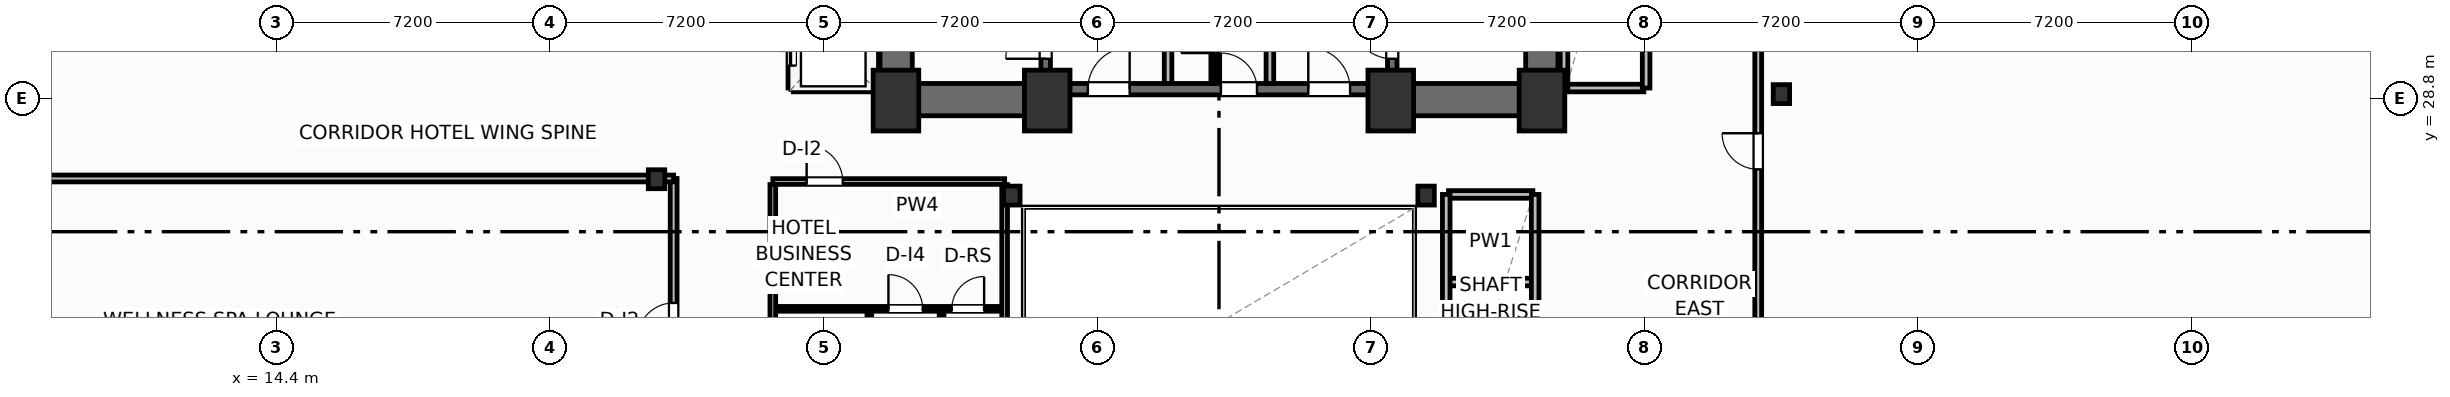
"""IFC4 building model, lengths in metres.
Left out: names, types, materials, properties, quantities, classifications, styles, units other than length and angle.
Written with IfcOpenShell. Run it as: python <this file> out.ifc"""

import sys

from ifc_helpers import new_model, si_unit, direction, frame, frame_2d, origin, origin_2d, place, context, subcontext, project, spatial, rectangle, i_section, extrude, element, fill, save


model = new_model("IFC4")
c1 = context("Model", 3, precision=1e-05, world=origin(), true_north=direction((0.0, 1.0)))
c2 = subcontext(c1, "Body", "Model", "MODEL_VIEW")
j1 = project(units=[si_unit("LENGTHUNIT", "METRE"), si_unit("PLANEANGLEUNIT", "RADIAN")], contexts=[c1])
p1 = place(None, origin())
s1 = spatial("IfcSite", under=j1, at=p1, CompositionType="ELEMENT")
p2 = place(p1, origin())
s2 = spatial("IfcBuilding", under=s1, at=p2, CompositionType="ELEMENT")
p3 = place(p2, frame((0.0, 0.0, 30.7)))
s3 = spatial("IfcBuildingStorey", under=s2, at=p3, CompositionType="ELEMENT", Elevation=30.7)
for number, where, z_axis, x_axis in (
    (1, (30.7, 28.75, 0.0), (0.0, 0.0, 1.0), (1.0, 0.0, 0.0)),
    (2, (34.68, 28.75, 0.0), (0.0, 0.0, 1.0), (1.0, 0.0, 0.0)),
    (3, (43.72, 28.75, 0.0), (0.0, 0.0, 1.0), (1.0, 0.0, 0.0)),
    (4, (47.7, 28.75, 0.0), (0.0, 0.0, 1.0), (1.0, 0.0, 0.0)),
):
    element("IfcColumn", number, at=place(p3, frame(where, z_axis=z_axis, x_axis=x_axis)), inside=s3, PredefinedType="COLUMN", context=c2, shape_type="SweptSolid", body=[
        extrude(rectangle(XDim=1.2, YDim=1.6, at=origin_2d()), origin(), (0.0, 0.0, 1.0), 3.7),
    ])
for number, where, z_axis, x_axis in (
    (5, (33.75, 26.25, 0.0), (0.0, 0.0, 1.0), (1.0, 0.0, 0.0)),
    (6, (44.65, 26.25, 0.0), (0.0, 0.0, 1.0), (1.0, 0.0, 0.0)),
    (7, (24.4, 26.68, 0.0), (0.0, 0.0, 1.0), (1.0, 0.0, 0.0)),
    (8, (54.0, 28.92, 0.0), (0.0, 0.0, 1.0), (1.0, 0.0, 0.0)),
):
    element("IfcColumn", number, at=place(p3, frame(where, z_axis=z_axis, x_axis=x_axis)), inside=s3, PredefinedType="COLUMN", context=c2, shape_type="SweptSolid", body=[
        extrude(i_section(OverallWidth=0.432, OverallDepth=0.498, WebThickness=0.056, FlangeThickness=0.089, FilletRadius=0.025, at=origin_2d()), origin(), (0.0, 0.0, 1.0), 3.7),
    ])
for number, where, z_axis, x_axis in (
    (9, (30.705, 29.2, 0.0), (0.0, 0.0, 1.0), (0.0, 1.0, 0.0)),
    (10, (47.695, 29.2, 0.0), (0.0, 0.0, 1.0), (0.0, 1.0, 0.0)),
):
    element("IfcWall", number, at=place(p3, frame(where, z_axis=z_axis, x_axis=x_axis)), inside=s3, PredefinedType="SHEAR", context=c2, shape_type="SweptSolid", body=[
        extrude(rectangle(XDim=9.22, YDim=0.85, at=frame_2d((4.61, 0.0))), origin(), (0.0, 0.0, 1.0), 3.45),
    ])
for number, where, z_axis, x_axis in (
    (11, (30.28, 28.775, 0.0), (0.0, 0.0, 1.0), (1.0, 0.0, 0.0)),
    (12, (43.6, 28.775, 0.0), (0.0, 0.0, 1.0), (1.0, 0.0, 0.0)),
):
    element("IfcWall", number, at=place(p3, frame(where, z_axis=z_axis, x_axis=x_axis)), inside=s3, PredefinedType="SHEAR", context=c2, shape_type="SweptSolid", body=[
        extrude(rectangle(XDim=4.52, YDim=0.85, at=frame_2d((2.26, 0.0))), origin(), (0.0, 0.0, 1.0), 3.45),
    ])
p4 = place(p3, frame((34.8, 29.05, 0.0), z_axis=(0.0, 0.0, 1.0), x_axis=(1.0, 0.0, 0.0)))
e13 = element("IfcWall", 13, at=p4, inside=s3, PredefinedType="SHEAR", context=c2, shape_type="SweptSolid", body=[
    extrude(rectangle(XDim=8.8, YDim=0.3, at=frame_2d((4.4, 0.0))), origin(), (0.0, 0.0, 1.0), 3.45),
])
p5 = place(p4, frame((0.95, 0.0, 0.0)))
e14 = element("IfcOpeningElement", 14, at=p5, cuts=e13, PredefinedType="OPENING", context=c2, shape_type="SweptSolid", body=[
    extrude(rectangle(XDim=1.1, YDim=2.15, at=frame_2d((0.55, 1.075))), frame((0.0, 0.16, 0.0), z_axis=(0.0, -1.0, 0.0), x_axis=(1.0, 0.0, 0.0)), (0.0, 0.0, 1.0), 0.32),
])
p6 = place(p4, frame((6.75, 0.0, 0.0)))
e15 = element("IfcOpeningElement", 15, at=p6, cuts=e13, PredefinedType="OPENING", context=c2, shape_type="SweptSolid", body=[
    extrude(rectangle(XDim=1.1, YDim=2.15, at=frame_2d((0.55, 1.075))), frame((0.0, 0.16, 0.0), z_axis=(0.0, -1.0, 0.0), x_axis=(1.0, 0.0, 0.0)), (0.0, 0.0, 1.0), 0.32),
])
p7 = place(p4, frame((4.45, 0.0, 0.0)))
e16 = element("IfcOpeningElement", 16, at=p7, cuts=e13, PredefinedType="OPENING", context=c2, shape_type="SweptSolid", body=[
    extrude(rectangle(XDim=0.95, YDim=2.15, at=frame_2d((0.475, 1.075))), frame((0.0, 0.16, 0.0), z_axis=(0.0, -1.0, 0.0), x_axis=(1.0, 0.0, 0.0)), (0.0, 0.0, 1.0), 0.32),
])
p8 = place(p3, frame((34.64, 29.2, 0.0), z_axis=(0.0, 0.0, 1.0), x_axis=(0.0, 1.0, 0.0)))
e17 = element("IfcWall", 17, at=p8, inside=s3, PredefinedType="SHEAR", context=c2, shape_type="SweptSolid", body=[
    extrude(rectangle(XDim=9.22, YDim=0.25, at=frame_2d((4.61, 0.0))), origin(), (0.0, 0.0, 1.0), 3.45),
])
p9 = place(p8, frame((0.65, 0.0, 0.0)))
e18 = element("IfcOpeningElement", 18, at=p9, cuts=e17, PredefinedType="OPENING", context=c2, shape_type="SweptSolid", body=[
    extrude(rectangle(XDim=1.05, YDim=2.15, at=frame_2d((0.525, 1.075))), frame((0.0, 0.135, 0.0), z_axis=(0.0, -1.0, 0.0), x_axis=(1.0, 0.0, 0.0)), (0.0, 0.0, 1.0), 0.27),
])
p10 = place(p3, frame((43.76, 29.2, 0.0), z_axis=(0.0, 0.0, 1.0), x_axis=(0.0, 1.0, 0.0)))
e19 = element("IfcWall", 19, at=p10, inside=s3, PredefinedType="SHEAR", context=c2, shape_type="SweptSolid", body=[
    extrude(rectangle(XDim=9.22, YDim=0.25, at=frame_2d((4.61, 0.0))), origin(), (0.0, 0.0, 1.0), 3.45),
])
p11 = place(p10, frame((0.65, 0.0, 0.0)))
e20 = element("IfcOpeningElement", 20, at=p11, cuts=e19, PredefinedType="OPENING", context=c2, shape_type="SweptSolid", body=[
    extrude(rectangle(XDim=1.05, YDim=2.15, at=frame_2d((0.525, 1.075))), frame((0.0, 0.135, 0.0), z_axis=(0.0, -1.0, 0.0), x_axis=(1.0, 0.0, 0.0)), (0.0, 0.0, 1.0), 0.27),
])
p12 = place(p3, frame((-2.728, 23.605, 0.0), z_axis=(0.0, 0.0, 1.0), x_axis=(0.823535075462, -0.567265351915, 0.0)))
e21 = element("IfcWall", 21, at=p12, inside=s3, PredefinedType="SOLIDWALL", context=c2, shape_type="SweptSolid", body=[
    extrude(rectangle(XDim=23.247, YDim=0.22, at=frame_2d((11.624, 0.0))), origin(), (0.0, 0.0, 1.0), 2.73),
])
p13 = place(p12, frame((10.799, 0.0, 0.8)))
e22 = element("IfcOpeningElement", 22, at=p13, cuts=e21, PredefinedType="OPENING", context=c2, shape_type="SweptSolid", body=[
    extrude(rectangle(XDim=1.65, YDim=1.65, at=frame_2d((0.825, 0.825))), frame((0.0, 0.12, 0.0), z_axis=(0.0, -1.0, 0.0), x_axis=(1.0, 0.0, 0.0)), (0.0, 0.0, 1.0), 0.24),
])
p14 = place(p3, frame((81.127, 26.995, 0.0), z_axis=(0.0, 0.0, 1.0), x_axis=(-0.823530169317, 0.567272474411, 0.0)))
e23 = element("IfcWall", 23, at=p14, inside=s3, PredefinedType="SOLIDWALL", context=c2, shape_type="SweptSolid", body=[
    extrude(rectangle(XDim=23.247, YDim=0.22, at=frame_2d((11.624, 0.0))), origin(), (0.0, 0.0, 1.0), 2.73),
])
p15 = place(p14, frame((10.799, 0.0, 0.8)))
e24 = element("IfcOpeningElement", 24, at=p15, cuts=e23, PredefinedType="OPENING", context=c2, shape_type="SweptSolid", body=[
    extrude(rectangle(XDim=1.65, YDim=1.65, at=frame_2d((0.825, 0.825))), frame((0.0, 0.12, 0.0), z_axis=(0.0, -1.0, 0.0), x_axis=(1.0, 0.0, 0.0)), (0.0, 0.0, 1.0), 0.24),
])
p16 = place(p3, frame((24.85, 19.2, 0.0), z_axis=(0.0, 0.0, 1.0), x_axis=(0.0, 1.0, 0.0)))
e25 = element("IfcWall", 25, at=p16, inside=s3, PredefinedType="PARTITIONING", context=c2, shape_type="SweptSolid", body=[
    extrude(rectangle(XDim=7.5, YDim=0.18, at=frame_2d((3.75, 0.0))), origin(), (0.0, 0.0, 1.0), 3.45),
])
p17 = place(p16, frame((3.275, 0.0, 0.0)))
e26 = element("IfcOpeningElement", 26, at=p17, cuts=e25, PredefinedType="OPENING", context=c2, shape_type="SweptSolid", body=[
    extrude(rectangle(XDim=0.95, YDim=2.05, at=frame_2d((0.475, 1.025))), frame((0.0, 0.1, 0.0), z_axis=(0.0, -1.0, 0.0), x_axis=(1.0, 0.0, 0.0)), (0.0, 0.0, 1.0), 0.2),
])
p18 = place(p3, frame((0.2, 26.7, 0.0), z_axis=(0.0, 0.0, 1.0), x_axis=(1.0, 0.0, 0.0)))
e27 = element("IfcWall", 27, at=p18, inside=s3, PredefinedType="PARTITIONING", context=c2, shape_type="SweptSolid", body=[
    extrude(rectangle(XDim=24.65, YDim=0.18, at=frame_2d((12.325, 0.0))), origin(), (0.0, 0.0, 1.0), 2.662),
])
p19 = place(p3, frame((53.39, 19.24, 0.0), z_axis=(0.0, 0.0, 1.0), x_axis=(0.0, 1.0, 0.0)))
e28 = element("IfcWall", 28, at=p19, inside=s3, PredefinedType="PARTITIONING", context=c2, shape_type="SweptSolid", body=[
    extrude(rectangle(XDim=20.06, YDim=0.18, at=frame_2d((10.03, 0.0))), origin(), (0.0, 0.0, 1.0), 3.45),
])
p20 = place(p19, frame((7.7, 0.0, 0.0)))
e29 = element("IfcOpeningElement", 29, at=p20, cuts=e28, PredefinedType="OPENING", context=c2, shape_type="SweptSolid", body=[
    extrude(rectangle(XDim=0.95, YDim=2.05, at=frame_2d((0.475, 1.025))), frame((0.0, 0.1, 0.0), z_axis=(0.0, -1.0, 0.0), x_axis=(1.0, 0.0, 0.0)), (0.0, 0.0, 1.0), 0.2),
])
for number, where, z_axis, x_axis in (
    (30, (37.86, 29.2, 0.0), (0.0, 0.0, 1.0), (0.0, 1.0, 0.0)),
    (31, (40.54, 29.2, 0.0), (0.0, 0.0, 1.0), (0.0, 1.0, 0.0)),
):
    element("IfcWall", number, at=place(p3, frame(where, z_axis=z_axis, x_axis=x_axis)), inside=s3, PredefinedType="PARTITIONING", context=c2, shape_type="SweptSolid", body=[
        extrude(rectangle(XDim=5.18, YDim=0.2, at=frame_2d((2.59, 0.0))), origin(), (0.0, 0.0, 1.0), 3.45),
    ])
p21 = place(p3, frame((39.05, 29.2, 0.0), z_axis=(0.0, 0.0, 1.0), x_axis=(0.0, 1.0, 0.0)))
e32 = element("IfcWall", 32, at=p21, inside=s3, PredefinedType="PARTITIONING", context=c2, shape_type="SweptSolid", body=[
    extrude(rectangle(XDim=5.22, YDim=0.125, at=frame_2d((2.61, 0.0))), origin(), (0.0, 0.0, 1.0), 3.45),
])
p22 = place(p21, frame((0.8, 0.0, 0.0)))
e33 = element("IfcOpeningElement", 33, at=p22, cuts=e32, PredefinedType="OPENING", context=c2, shape_type="SweptSolid", body=[
    extrude(rectangle(XDim=0.85, YDim=2.05, at=frame_2d((0.425, 1.025))), frame((0.0, 0.073, 0.0), z_axis=(0.0, -1.0, 0.0), x_axis=(1.0, 0.0, 0.0)), (0.0, 0.0, 1.0), 0.145),
])
p23 = place(p21, frame((3.4, 0.0, 0.0)))
e34 = element("IfcOpeningElement", 34, at=p23, cuts=e32, PredefinedType="OPENING", context=c2, shape_type="SweptSolid", body=[
    extrude(rectangle(XDim=0.85, YDim=2.05, at=frame_2d((0.425, 1.025))), frame((0.0, 0.073, 0.0), z_axis=(0.0, -1.0, 0.0), x_axis=(1.0, 0.0, 0.0)), (0.0, 0.0, 1.0), 0.145),
])
p24 = place(p3, frame((27.46, 26.62, 0.0), z_axis=(0.0, 0.0, 1.0), x_axis=(1.0, 0.0, 0.0)))
e35 = element("IfcWall", 35, at=p24, inside=s3, PredefinedType="PARTITIONING", context=c2, shape_type="SweptSolid", body=[
    extrude(rectangle(XDim=6.1, YDim=0.15, at=frame_2d((3.05, 0.0))), origin(), (0.0, 0.0, 1.0), 2.662),
])
p25 = place(p24, frame((0.89, 0.0, 0.0)))
e36 = element("IfcOpeningElement", 36, at=p25, cuts=e35, PredefinedType="OPENING", context=c2, shape_type="SweptSolid", body=[
    extrude(rectangle(XDim=0.95, YDim=2.05, at=frame_2d((0.475, 1.025))), frame((0.0, 0.085, 0.0), z_axis=(0.0, -1.0, 0.0), x_axis=(1.0, 0.0, 0.0)), (0.0, 0.0, 1.0), 0.17),
])
p26 = place(p3, frame((27.52, 23.27, 0.0), z_axis=(0.0, 0.0, 1.0), x_axis=(1.0, 0.0, 0.0)))
e37 = element("IfcWall", 37, at=p26, inside=s3, PredefinedType="PARTITIONING", context=c2, shape_type="SweptSolid", body=[
    extrude(rectangle(XDim=6.0, YDim=0.125, at=frame_2d((3.0, 0.0))), origin(), (0.0, 0.0, 1.0), 3.45),
])
p27 = place(p26, frame((2.982, 0.0, 0.0)))
e38 = element("IfcOpeningElement", 38, at=p27, cuts=e37, PredefinedType="OPENING", context=c2, shape_type="SweptSolid", body=[
    extrude(rectangle(XDim=0.9, YDim=2.05, at=frame_2d((0.45, 1.025))), frame((0.0, 0.073, 0.0), z_axis=(0.0, -1.0, 0.0), x_axis=(1.0, 0.0, 0.0)), (0.0, 0.0, 1.0), 0.145),
])
p28 = place(p26, frame((4.65, 0.0, 0.0)))
e39 = element("IfcOpeningElement", 39, at=p28, cuts=e37, PredefinedType="OPENING", context=c2, shape_type="SweptSolid", body=[
    extrude(rectangle(XDim=0.85, YDim=2.05, at=frame_2d((0.425, 1.025))), frame((0.0, 0.073, 0.0), z_axis=(0.0, -1.0, 0.0), x_axis=(1.0, 0.0, 0.0)), (0.0, 0.0, 1.0), 0.145),
])
for number, where, z_axis, x_axis in (
    (40, (30.0, 19.38, 0.0), (0.0, 0.0, 1.0), (0.0, 1.0, 0.0)),
    (41, (31.9, 19.38, 0.0), (0.0, 0.0, 1.0), (0.0, 1.0, 0.0)),
):
    element("IfcWall", number, at=place(p3, frame(where, z_axis=z_axis, x_axis=x_axis)), inside=s3, PredefinedType="PARTITIONING", context=c2, shape_type="SweptSolid", body=[
        extrude(rectangle(XDim=3.82, YDim=0.125, at=frame_2d((1.91, 0.0))), origin(), (0.0, 0.0, 1.0), 3.45),
    ])
p29 = place(p3, frame((27.46, 19.38, 0.0), z_axis=(0.0, 0.0, 1.0), x_axis=(0.0, 1.0, 0.0)))
e42 = element("IfcWall", 42, at=p29, inside=s3, PredefinedType="PARTITIONING", context=c2, shape_type="SweptSolid", body=[
    extrude(rectangle(XDim=7.16, YDim=0.15, at=frame_2d((3.58, 0.0))), origin(), (0.0, 0.0, 1.0), 3.45),
])
p30 = place(p29, frame((1.1, 0.0, 0.0)))
e43 = element("IfcOpeningElement", 43, at=p30, cuts=e42, PredefinedType="OPENING", context=c2, shape_type="SweptSolid", body=[
    extrude(rectangle(XDim=0.9, YDim=2.05, at=frame_2d((0.45, 1.025))), frame((0.0, 0.085, 0.0), z_axis=(0.0, -1.0, 0.0), x_axis=(1.0, 0.0, 0.0)), (0.0, 0.0, 1.0), 0.17),
])
p31 = place(p3, frame((33.56, 19.38, 0.0), z_axis=(0.0, 0.0, 1.0), x_axis=(0.0, 1.0, 0.0)))
e44 = element("IfcWall", 44, at=p31, inside=s3, PredefinedType="PARTITIONING", context=c2, shape_type="SweptSolid", body=[
    extrude(rectangle(XDim=7.16, YDim=0.15, at=frame_2d((3.58, 0.0))), origin(), (0.0, 0.0, 1.0), 2.824),
])
p32 = place(p3, frame((28.0, 29.08, 0.0), z_axis=(0.0, 0.0, 1.0), x_axis=(1.0, 0.0, 0.0)))
e45 = element("IfcWall", 45, at=p32, inside=s3, PredefinedType="PARTITIONING", context=c2, shape_type="SweptSolid", body=[
    extrude(rectangle(XDim=2.1, YDim=0.2, at=frame_2d((1.05, 0.0))), origin(), (0.0, 0.0, 1.0), 3.45),
])
p33 = place(p3, frame((30.12, 29.08, 0.0), z_axis=(0.0, 0.0, 1.0), x_axis=(0.0, 1.0, 0.0)))
e46 = element("IfcWall", 46, at=p33, inside=s3, PredefinedType="PARTITIONING", context=c2, shape_type="SweptSolid", body=[
    extrude(rectangle(XDim=6.89, YDim=0.2, at=frame_2d((3.445, 0.0))), origin(), (0.0, 0.0, 1.0), 3.45),
])
p34 = place(p3, frame((27.96, 29.08, 0.0), z_axis=(0.0, 0.0, 1.0), x_axis=(0.0, 1.0, 0.0)))
e47 = element("IfcWall", 47, at=p34, inside=s3, PredefinedType="PARTITIONING", context=c2, shape_type="SweptSolid", body=[
    extrude(rectangle(XDim=6.89, YDim=0.2, at=frame_2d((3.445, 0.0))), origin(), (0.0, 0.0, 1.0), 3.45),
])
p35 = place(p34, frame((0.59, 0.0, 0.0)))
e48 = element("IfcOpeningElement", 48, at=p35, cuts=e47, PredefinedType="OPENING", context=c2, shape_type="SweptSolid", body=[
    extrude(rectangle(XDim=1.1, YDim=2.15, at=frame_2d((0.55, 1.075))), frame((0.0, 0.11, 0.0), z_axis=(0.0, -1.0, 0.0), x_axis=(1.0, 0.0, 0.0)), (0.0, 0.0, 1.0), 0.22),
])
p36 = place(p34, frame((2.89, 0.0, 0.0)))
e49 = element("IfcOpeningElement", 49, at=p36, cuts=e47, PredefinedType="OPENING", context=c2, shape_type="SweptSolid", body=[
    extrude(rectangle(XDim=1.1, YDim=2.15, at=frame_2d((0.55, 1.075))), frame((0.0, 0.11, 0.0), z_axis=(0.0, -1.0, 0.0), x_axis=(1.0, 0.0, 0.0)), (0.0, 0.0, 1.0), 0.22),
])
p37 = place(p34, frame((5.19, 0.0, 0.0)))
e50 = element("IfcOpeningElement", 50, at=p37, cuts=e47, PredefinedType="OPENING", context=c2, shape_type="SweptSolid", body=[
    extrude(rectangle(XDim=1.1, YDim=2.15, at=frame_2d((0.55, 1.075))), frame((0.0, 0.11, 0.0), z_axis=(0.0, -1.0, 0.0), x_axis=(1.0, 0.0, 0.0)), (0.0, 0.0, 1.0), 0.22),
])
p38 = place(p3, frame((48.32, 29.08, 0.0), z_axis=(0.0, 0.0, 1.0), x_axis=(1.0, 0.0, 0.0)))
e51 = element("IfcWall", 51, at=p38, inside=s3, PredefinedType="PARTITIONING", context=c2, shape_type="SweptSolid", body=[
    extrude(rectangle(XDim=2.06, YDim=0.2, at=frame_2d((1.03, 0.0))), origin(), (0.0, 0.0, 1.0), 2.662),
])
for number, where, z_axis, x_axis in (
    (52, (48.28, 29.08, 0.0), (0.0, 0.0, 1.0), (0.0, 1.0, 0.0)),
    (53, (50.44, 29.08, 0.0), (0.0, 0.0, 1.0), (0.0, 1.0, 0.0)),
):
    element("IfcWall", number, at=place(p3, frame(where, z_axis=z_axis, x_axis=x_axis)), inside=s3, PredefinedType="PARTITIONING", context=c2, shape_type="SweptSolid", body=[
        extrude(rectangle(XDim=6.89, YDim=0.2, at=frame_2d((3.445, 0.0))), origin(), (0.0, 0.0, 1.0), 3.45),
    ])
for number, where, z_axis, x_axis in (
    (54, (45.24, 23.975, 0.0), (0.0, 0.0, 1.0), (1.0, 0.0, 0.0)),
    (55, (45.24, 26.28, 0.0), (0.0, 0.0, 1.0), (1.0, 0.0, 0.0)),
):
    element("IfcWall", number, at=place(p3, frame(where, z_axis=z_axis, x_axis=x_axis)), inside=s3, PredefinedType="PARTITIONING", context=c2, shape_type="SweptSolid", body=[
        extrude(rectangle(XDim=2.22, YDim=0.2, at=frame_2d((1.11, 0.0))), origin(), (0.0, 0.0, 1.0), 3.45),
    ])
for number, where, z_axis, x_axis in (
    (56, (45.18, 19.38, 0.0), (0.0, 0.0, 1.0), (0.0, 1.0, 0.0)),
    (57, (47.52, 19.38, 0.0), (0.0, 0.0, 1.0), (0.0, 1.0, 0.0)),
):
    element("IfcWall", number, at=place(p3, frame(where, z_axis=z_axis, x_axis=x_axis)), inside=s3, PredefinedType="PARTITIONING", context=c2, shape_type="SweptSolid", body=[
        extrude(rectangle(XDim=6.9, YDim=0.2, at=frame_2d((3.45, 0.0))), origin(), (0.0, 0.0, 1.0), 3.45),
    ])
p39 = place(p17, origin())
e58 = element("IfcDoor", 58, at=p39, inside=s3, OperationType="SINGLE_SWING_LEFT", PredefinedType="DOOR", context=c2, shape_type="SweptSolid", body=[
    extrude(rectangle(XDim=0.95, YDim=2.05, at=frame_2d((0.475, 1.025))), frame((0.0, 0.025, 0.0), z_axis=(0.0, -1.0, 0.0), x_axis=(1.0, 0.0, 0.0)), (0.0, 0.0, 1.0), 0.05),
])
fill(e26, e58)
p40 = place(p20, origin())
e59 = element("IfcDoor", 59, at=p40, inside=s3, OperationType="SINGLE_SWING_RIGHT", PredefinedType="DOOR", context=c2, shape_type="SweptSolid", body=[
    extrude(rectangle(XDim=0.95, YDim=2.05, at=frame_2d((0.475, 1.025))), frame((0.0, 0.025, 0.0), z_axis=(0.0, -1.0, 0.0), x_axis=(1.0, 0.0, 0.0)), (0.0, 0.0, 1.0), 0.05),
])
fill(e29, e59)
p41 = place(p9, origin())
e60 = element("IfcDoor", 60, at=p41, inside=s3, OperationType="SINGLE_SWING_LEFT", PredefinedType="DOOR", context=c2, shape_type="SweptSolid", body=[
    extrude(rectangle(XDim=1.05, YDim=2.15, at=frame_2d((0.525, 1.075))), frame((0.0, 0.025, 0.0), z_axis=(0.0, -1.0, 0.0), x_axis=(1.0, 0.0, 0.0)), (0.0, 0.0, 1.0), 0.05),
])
fill(e18, e60)
p42 = place(p11, origin())
e61 = element("IfcDoor", 61, at=p42, inside=s3, OperationType="SINGLE_SWING_RIGHT", PredefinedType="DOOR", context=c2, shape_type="SweptSolid", body=[
    extrude(rectangle(XDim=1.05, YDim=2.15, at=frame_2d((0.525, 1.075))), frame((0.0, 0.025, 0.0), z_axis=(0.0, -1.0, 0.0), x_axis=(1.0, 0.0, 0.0)), (0.0, 0.0, 1.0), 0.05),
])
fill(e20, e61)
p43 = place(p5, origin())
e62 = element("IfcDoor", 62, at=p43, inside=s3, OperationType="SINGLE_SWING_RIGHT", PredefinedType="DOOR", context=c2, shape_type="SweptSolid", body=[
    extrude(rectangle(XDim=1.1, YDim=2.15, at=frame_2d((0.55, 1.075))), frame((0.0, 0.025, 0.0), z_axis=(0.0, -1.0, 0.0), x_axis=(1.0, 0.0, 0.0)), (0.0, 0.0, 1.0), 0.05),
])
fill(e14, e62)
p44 = place(p6, origin())
e63 = element("IfcDoor", 63, at=p44, inside=s3, OperationType="SINGLE_SWING_LEFT", PredefinedType="DOOR", context=c2, shape_type="SweptSolid", body=[
    extrude(rectangle(XDim=1.1, YDim=2.15, at=frame_2d((0.55, 1.075))), frame((0.0, 0.025, 0.0), z_axis=(0.0, -1.0, 0.0), x_axis=(1.0, 0.0, 0.0)), (0.0, 0.0, 1.0), 0.05),
])
fill(e15, e63)
p45 = place(p22, origin())
e64 = element("IfcDoor", 64, at=p45, inside=s3, OperationType="SINGLE_SWING_LEFT", PredefinedType="DOOR", context=c2, shape_type="SweptSolid", body=[
    extrude(rectangle(XDim=0.85, YDim=2.05, at=frame_2d((0.425, 1.025))), frame((0.0, 0.025, 0.0), z_axis=(0.0, -1.0, 0.0), x_axis=(1.0, 0.0, 0.0)), (0.0, 0.0, 1.0), 0.05),
])
fill(e33, e64)
p46 = place(p7, origin())
e65 = element("IfcDoor", 65, at=p46, inside=s3, OperationType="SINGLE_SWING_LEFT", PredefinedType="DOOR", context=c2, shape_type="SweptSolid", body=[
    extrude(rectangle(XDim=0.95, YDim=2.15, at=frame_2d((0.475, 1.075))), frame((0.0, 0.025, 0.0), z_axis=(0.0, -1.0, 0.0), x_axis=(1.0, 0.0, 0.0)), (0.0, 0.0, 1.0), 0.05),
])
fill(e16, e65)
p47 = place(p25, origin())
e66 = element("IfcDoor", 66, at=p47, inside=s3, OperationType="SINGLE_SWING_LEFT", PredefinedType="DOOR", context=c2, shape_type="SweptSolid", body=[
    extrude(rectangle(XDim=0.95, YDim=2.05, at=frame_2d((0.475, 1.025))), frame((0.0, 0.025, 0.0), z_axis=(0.0, -1.0, 0.0), x_axis=(1.0, 0.0, 0.0)), (0.0, 0.0, 1.0), 0.05),
])
fill(e36, e66)
p48 = place(p27, origin())
e67 = element("IfcDoor", 67, at=p48, inside=s3, OperationType="SINGLE_SWING_LEFT", PredefinedType="DOOR", context=c2, shape_type="SweptSolid", body=[
    extrude(rectangle(XDim=0.9, YDim=2.05, at=frame_2d((0.45, 1.025))), frame((0.0, 0.025, 0.0), z_axis=(0.0, -1.0, 0.0), x_axis=(1.0, 0.0, 0.0)), (0.0, 0.0, 1.0), 0.05),
])
fill(e38, e67)
p49 = place(p28, origin())
e68 = element("IfcDoor", 68, at=p49, inside=s3, OperationType="SINGLE_SWING_RIGHT", PredefinedType="DOOR", context=c2, shape_type="SweptSolid", body=[
    extrude(rectangle(XDim=0.85, YDim=2.05, at=frame_2d((0.425, 1.025))), frame((0.0, 0.025, 0.0), z_axis=(0.0, -1.0, 0.0), x_axis=(1.0, 0.0, 0.0)), (0.0, 0.0, 1.0), 0.05),
])
fill(e39, e68)
p50 = place(p35, origin())
e69 = element("IfcDoor", 69, at=p50, inside=s3, OperationType="SLIDING_TO_LEFT", PredefinedType="DOOR", context=c2, shape_type="SweptSolid", body=[
    extrude(rectangle(XDim=1.1, YDim=2.15, at=frame_2d((0.55, 1.075))), frame((0.0, 0.025, 0.0), z_axis=(0.0, -1.0, 0.0), x_axis=(1.0, 0.0, 0.0)), (0.0, 0.0, 1.0), 0.05),
])
fill(e48, e69)
save(model, sys.argv[1])
